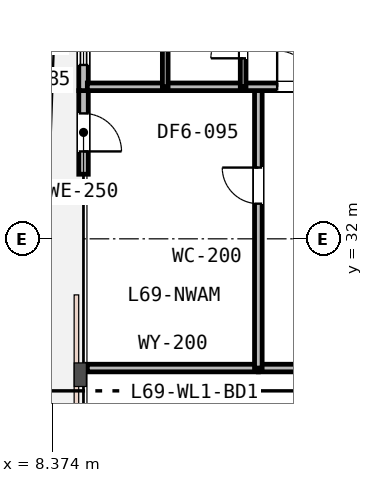
"""IFC4 building model, lengths in metres.
Left out: names, types, materials, properties, quantities, classifications, styles, units other than length and angle.
Written with IfcOpenShell. Run it as: python <this file> out.ifc"""

import sys

from ifc_helpers import new_model, si_unit, direction, frame, frame_2d, origin, place, context, subcontext, project, spatial, rectangle, extrude, element, fill, save


model = new_model("IFC4")
c1 = context("Model", 3, precision=1e-05, world=origin(), true_north=direction((0.0, 1.0)))
c2 = subcontext(c1, "Body", "Model", "MODEL_VIEW")
j1 = project(units=[si_unit("LENGTHUNIT", "METRE"), si_unit("PLANEANGLEUNIT", "RADIAN")], contexts=[c1])
p1 = place(None, origin())
s1 = spatial("IfcSite", under=j1, at=p1, CompositionType="ELEMENT")
p2 = place(p1, origin())
s2 = spatial("IfcBuilding", under=s1, at=p2, CompositionType="ELEMENT")
p3 = place(p2, frame((0.0, 0.0, 267.8)))
s3 = spatial("IfcBuildingStorey", under=s2, at=p3, CompositionType="ELEMENT", Elevation=267.8)
p4 = place(p3, frame((9.2, 35.9, 0.0), z_axis=(0.0, 0.0, 1.0), x_axis=(0.0, -1.0, 0.0)))
e1 = element("IfcWall", 1, at=p4, inside=s3, PredefinedType="STANDARD", context=c2, shape_type="SweptSolid", body=[
    extrude(rectangle(XDim=2.2, YDim=0.25, at=frame_2d((1.1, 0.0))), origin(), (0.0, 0.0, 1.0), 3.53),
])
p5 = place(p4, frame((0.6, 0.0, 0.0)))
e2 = element("IfcOpeningElement", 2, at=p5, cuts=e1, PredefinedType="OPENING", context=c2, shape_type="SweptSolid", body=[
    extrude(rectangle(XDim=1.0, YDim=2.15, at=frame_2d((0.5, 1.075))), frame((0.0, 0.135, 0.0), z_axis=(0.0, -1.0, 0.0), x_axis=(1.0, 0.0, 0.0)), (0.0, 0.0, 1.0), 0.27),
])
p6 = place(p3, frame((9.2, 40.4, 0.0), z_axis=(0.0, 0.0, 1.0), x_axis=(0.0, -1.0, 0.0)))
e3 = element("IfcWall", 3, at=p6, inside=s3, PredefinedType="STANDARD", context=c2, shape_type="SweptSolid", body=[
    extrude(rectangle(XDim=4.5, YDim=0.25, at=frame_2d((2.25, 0.0))), origin(), (0.0, 0.0, 1.0), 3.53),
])
p7 = place(p6, frame((0.435, 0.0, 0.85)))
e4 = element("IfcOpeningElement", 4, at=p7, cuts=e3, PredefinedType="OPENING", context=c2, shape_type="SweptSolid", body=[
    extrude(rectangle(XDim=1.2, YDim=1.6, at=frame_2d((0.6, 0.8))), frame((0.0, 0.135, 0.0), z_axis=(0.0, -1.0, 0.0), x_axis=(1.0, 0.0, 0.0)), (0.0, 0.0, 1.0), 0.27),
])
p8 = place(p6, frame((2.625, 0.0, 0.85)))
e5 = element("IfcOpeningElement", 5, at=p8, cuts=e3, PredefinedType="OPENING", context=c2, shape_type="SweptSolid", body=[
    extrude(rectangle(XDim=1.2, YDim=1.6, at=frame_2d((0.6, 0.8))), frame((0.0, 0.135, 0.0), z_axis=(0.0, -1.0, 0.0), x_axis=(1.0, 0.0, 0.0)), (0.0, 0.0, 1.0), 0.27),
])
p9 = place(p3, frame((9.3, 28.6, 0.0), z_axis=(0.0, 0.0, 1.0), x_axis=(1.0, 0.0, 0.0)))
e6 = element("IfcWall", 6, at=p9, inside=s3, PredefinedType="PARTITIONING", context=c2, shape_type="SweptSolid", body=[
    extrude(rectangle(XDim=4.5, YDim=0.2, at=frame_2d((2.25, 0.0))), origin(), (0.0, 0.0, 1.0), 3.53),
])
p10 = place(p3, frame((13.8, 28.6, 0.0), z_axis=(0.0, 0.0, 1.0), x_axis=(1.0, 0.0, 0.0)))
e7 = element("IfcWall", 7, at=p10, inside=s3, PredefinedType="PARTITIONING", context=c2, shape_type="SweptSolid", body=[
    extrude(rectangle(XDim=4.2, YDim=0.2, at=frame_2d((2.1, 0.0))), origin(), (0.0, 0.0, 1.0), 3.16),
])
p11 = place(p3, frame((13.8, 28.6, 0.0), z_axis=(0.0, 0.0, 1.0), x_axis=(0.0, 1.0, 0.0)))
e8 = element("IfcWall", 8, at=p11, inside=s3, PredefinedType="PARTITIONING", context=c2, shape_type="SweptSolid", body=[
    extrude(rectangle(XDim=7.4, YDim=0.2, at=frame_2d((3.7, 0.0))), origin(), (0.0, 0.0, 1.0), 3.53),
])
p12 = place(p11, frame((4.325, 0.0, 0.0)))
e9 = element("IfcOpeningElement", 9, at=p12, cuts=e8, PredefinedType="OPENING", context=c2, shape_type="SweptSolid", body=[
    extrude(rectangle(XDim=0.95, YDim=2.15, at=frame_2d((0.475, 1.075))), frame((0.0, 0.11, 0.0), z_axis=(0.0, -1.0, 0.0), x_axis=(1.0, 0.0, 0.0)), (0.0, 0.0, 1.0), 0.22),
])
p13 = place(p3, frame((9.3, 36.0, 0.0), z_axis=(0.0, 0.0, 1.0), x_axis=(1.0, 0.0, 0.0)))
e10 = element("IfcWall", 10, at=p13, inside=s3, PredefinedType="PARTITIONING", context=c2, shape_type="SweptSolid", body=[
    extrude(rectangle(XDim=6.5, YDim=0.2, at=frame_2d((3.25, 0.0))), origin(), (0.0, 0.0, 1.0), 3.53),
])
p14 = place(p13, frame((4.995, 0.0, 0.0)))
e11 = element("IfcOpeningElement", 11, at=p14, cuts=e10, PredefinedType="OPENING", context=c2, shape_type="SweptSolid", body=[
    extrude(rectangle(XDim=0.95, YDim=2.15, at=frame_2d((0.475, 1.075))), frame((0.0, 0.11, 0.0), z_axis=(0.0, -1.0, 0.0), x_axis=(1.0, 0.0, 0.0)), (0.0, 0.0, 1.0), 0.22),
])
p15 = place(p3, frame((13.4, 36.0, 0.0), z_axis=(0.0, 0.0, 1.0), x_axis=(0.0, 1.0, 0.0)))
e12 = element("IfcWall", 12, at=p15, inside=s3, PredefinedType="PARTITIONING", context=c2, shape_type="SweptSolid", body=[
    extrude(rectangle(XDim=2.35, YDim=0.15, at=frame_2d((1.175, 0.0))), origin(), (0.0, 0.0, 1.0), 3.53),
])
p16 = place(p15, frame((0.75, 0.0, 0.0)))
e13 = element("IfcOpeningElement", 13, at=p16, cuts=e12, PredefinedType="OPENING", context=c2, shape_type="SweptSolid", body=[
    extrude(rectangle(XDim=0.85, YDim=2.15, at=frame_2d((0.425, 1.075))), frame((0.0, 0.085, 0.0), z_axis=(0.0, -1.0, 0.0), x_axis=(1.0, 0.0, 0.0)), (0.0, 0.0, 1.0), 0.17),
])
p17 = place(p3, frame((11.35, 36.0, 0.0), z_axis=(0.0, 0.0, 1.0), x_axis=(0.0, 1.0, 0.0)))
e14 = element("IfcWall", 14, at=p17, inside=s3, PredefinedType="PARTITIONING", context=c2, shape_type="SweptSolid", body=[
    extrude(rectangle(XDim=2.35, YDim=0.15, at=frame_2d((1.175, 0.0))), origin(), (0.0, 0.0, 1.0), 3.53),
])
p18 = place(p5, origin())
e15 = element("IfcDoor", 15, at=p18, inside=s3, OperationType="SINGLE_SWING_RIGHT", PredefinedType="DOOR", context=c2, shape_type="SweptSolid", body=[
    extrude(rectangle(XDim=1.0, YDim=2.15, at=frame_2d((0.5, 1.075))), frame((0.0, 0.025, 0.0), z_axis=(0.0, -1.0, 0.0), x_axis=(1.0, 0.0, 0.0)), (0.0, 0.0, 1.0), 0.05),
])
fill(e2, e15)
p19 = place(p8, origin())
e16 = element("IfcWindow", 16, at=p19, inside=s3, PartitioningType="SINGLE_PANEL", PredefinedType="WINDOW", context=c2, shape_type="SweptSolid", body=[
    extrude(rectangle(XDim=1.2, YDim=1.6, at=frame_2d((0.6, 0.8))), frame((0.0, 0.03, 0.0), z_axis=(0.0, -1.0, 0.0), x_axis=(1.0, 0.0, 0.0)), (0.0, 0.0, 1.0), 0.06),
])
fill(e5, e16)
p20 = place(p12, origin())
e17 = element("IfcDoor", 17, at=p20, inside=s3, OperationType="SINGLE_SWING_RIGHT", PredefinedType="DOOR", context=c2, shape_type="SweptSolid", body=[
    extrude(rectangle(XDim=0.95, YDim=2.15, at=frame_2d((0.475, 1.075))), frame((0.0, 0.025, 0.0), z_axis=(0.0, -1.0, 0.0), x_axis=(1.0, 0.0, 0.0)), (0.0, 0.0, 1.0), 0.05),
])
fill(e9, e17)
p21 = place(p14, origin())
e18 = element("IfcDoor", 18, at=p21, inside=s3, OperationType="SINGLE_SWING_LEFT", PredefinedType="DOOR", context=c2, shape_type="SweptSolid", body=[
    extrude(rectangle(XDim=0.95, YDim=2.15, at=frame_2d((0.475, 1.075))), frame((0.0, 0.025, 0.0), z_axis=(0.0, -1.0, 0.0), x_axis=(1.0, 0.0, 0.0)), (0.0, 0.0, 1.0), 0.05),
])
fill(e11, e18)
p22 = place(p16, origin())
e19 = element("IfcDoor", 19, at=p22, inside=s3, OperationType="SINGLE_SWING_LEFT", PredefinedType="DOOR", context=c2, shape_type="SweptSolid", body=[
    extrude(rectangle(XDim=0.85, YDim=2.15, at=frame_2d((0.425, 1.075))), frame((0.0, 0.025, 0.0), z_axis=(0.0, -1.0, 0.0), x_axis=(1.0, 0.0, 0.0)), (0.0, 0.0, 1.0), 0.05),
])
fill(e13, e19)
save(model, sys.argv[1])
